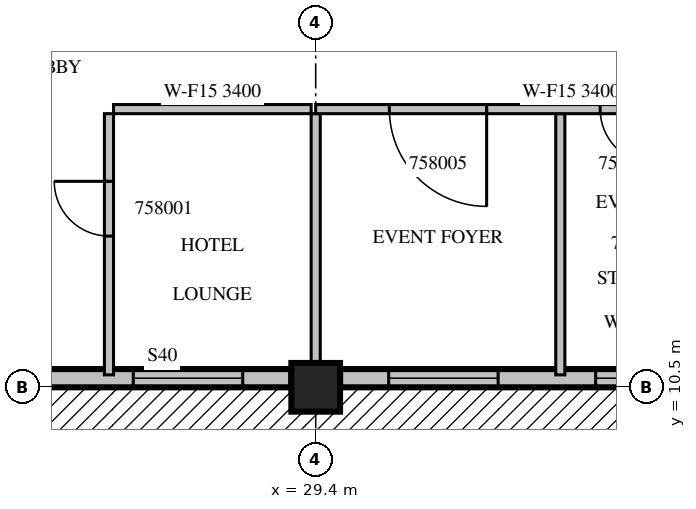
"""IFC4 building model, lengths in metres.
Left out: names, types, materials, properties, quantities, classifications, styles, units other than length and angle.
Written with IfcOpenShell. Run it as: python <this file> out.ifc"""

import sys

from ifc_helpers import new_model, si_unit, direction, frame, frame_2d, origin, origin_2d, place, context, subcontext, project, spatial, rectangle, extrude, source, transform, mapped, element, fill, save


model = new_model("IFC4")
c1 = context("Model", 3, precision=1e-05, world=origin(), true_north=direction((0.0, 1.0)))
c2 = subcontext(c1, "Body", "Model", "MODEL_VIEW")
j1 = project(units=[si_unit("LENGTHUNIT", "METRE"), si_unit("PLANEANGLEUNIT", "RADIAN")], contexts=[c1])
p1 = place(None, origin())
s1 = spatial("IfcSite", under=j1, at=p1, CompositionType="ELEMENT")
p2 = place(p1, origin())
s2 = spatial("IfcBuilding", under=s1, at=p2, CompositionType="ELEMENT")
p3 = place(p2, frame((0.0, 0.0, 253.8)))
s3 = spatial("IfcBuildingStorey", under=s2, at=p3, CompositionType="ELEMENT", Elevation=253.8)
m1 = source(origin(), c2, "Body", "SweptSolid", [
    extrude(rectangle(XDim=0.8, YDim=0.8, at=origin_2d()), origin(), (0.0, 0.0, 1.0), 3.8),
])
p4 = place(p3, frame((29.4, 10.5, 0.0), z_axis=(0.0, 0.0, 1.0), x_axis=(1.0, 0.0, 0.0)))
e1 = element("IfcColumn", 1, at=p4, inside=s3, PredefinedType="COLUMN", context=c2, shape_type="MappedRepresentation", body=[
    mapped(m1, transform((0.0, 0.0, 0.0), scale=1.0)),
])
m2 = source(origin(), c2, "Body", "SweptSolid", [
    extrude(rectangle(XDim=7.2, YDim=0.3, at=frame_2d((3.6, 0.0))), origin(), (0.0, 0.0, 1.0), 3.4),
])
p5 = place(p3, frame((21.8, 10.65, 0.0), z_axis=(0.0, 0.0, 1.0), x_axis=(1.0, 0.0, 0.0)))
e2 = element("IfcWall", 2, at=p5, inside=s3, PredefinedType="STANDARD", context=c2, shape_type="MappedRepresentation", body=[
    mapped(m2, transform((0.0, 0.0, 0.0), scale=1.0)),
])
m3 = source(origin(), c2, "Body", "SweptSolid", [
    extrude(rectangle(XDim=1.8, YDim=2.4, at=frame_2d((0.9, 1.2))), frame((0.0, 0.16, 0.0), z_axis=(0.0, -1.0, 0.0), x_axis=(1.0, 0.0, 0.0)), (0.0, 0.0, 1.0), 0.32),
])
p6 = place(p5, frame((0.4, 0.0, 0.0)))
e3 = element("IfcOpeningElement", 3, at=p6, cuts=e2, PredefinedType="OPENING", context=c2, shape_type="MappedRepresentation", body=[
    mapped(m3, transform((0.0, 0.0, 0.0), scale=1.0)),
])
p7 = place(p5, frame((4.6, 0.0, 0.0)))
e4 = element("IfcOpeningElement", 4, at=p7, cuts=e2, PredefinedType="OPENING", context=c2, shape_type="MappedRepresentation", body=[
    mapped(m3, transform((0.0, 0.0, 0.0), scale=1.0)),
])
m4 = source(origin(), c2, "Body", "SweptSolid", [
    extrude(rectangle(XDim=7.6, YDim=0.3, at=frame_2d((3.8, 0.0))), origin(), (0.0, 0.0, 1.0), 3.4),
])
p8 = place(p3, frame((29.8, 10.65, 0.0), z_axis=(0.0, 0.0, 1.0), x_axis=(1.0, 0.0, 0.0)))
e5 = element("IfcWall", 5, at=p8, inside=s3, PredefinedType="STANDARD", context=c2, shape_type="MappedRepresentation", body=[
    mapped(m4, transform((0.0, 0.0, 0.0), scale=1.0)),
])
p9 = place(p8, frame((0.8, 0.0, 0.0)))
e6 = element("IfcOpeningElement", 6, at=p9, cuts=e5, PredefinedType="OPENING", context=c2, shape_type="MappedRepresentation", body=[
    mapped(m3, transform((0.0, 0.0, 0.0), scale=1.0)),
])
m5 = source(origin(), c2, "Body", "SweptSolid", [
    extrude(rectangle(XDim=1.2, YDim=2.3, at=frame_2d((0.6, 1.15))), frame((0.0, 0.16, 0.0), z_axis=(0.0, -1.0, 0.0), x_axis=(1.0, 0.0, 0.0)), (0.0, 0.0, 1.0), 0.32),
])
p10 = place(p8, frame((4.204, 0.0, 0.6)))
e7 = element("IfcOpeningElement", 7, at=p10, cuts=e5, PredefinedType="OPENING", context=c2, shape_type="MappedRepresentation", body=[
    mapped(m5, transform((0.0, 0.0, 0.0), scale=1.0)),
])
m6 = source(origin(), c2, "Body", "SweptSolid", [
    extrude(rectangle(XDim=4.295, YDim=0.15, at=frame_2d((2.147, 0.0))), origin(), (0.0, 0.0, 1.0), 3.4),
])
p11 = place(p3, frame((26.0, 15.0, 0.0), z_axis=(0.0, 0.0, 1.0), x_axis=(0.0, -1.0, 0.0)))
e8 = element("IfcWall", 8, at=p11, inside=s3, PredefinedType="PARTITIONING", context=c2, shape_type="MappedRepresentation", body=[
    mapped(m6, transform((0.0, 0.0, 0.0), scale=1.0)),
])
m7 = source(origin(), c2, "Body", "SweptSolid", [
    extrude(rectangle(XDim=0.9, YDim=2.1, at=frame_2d((0.45, 1.05))), frame((0.0, 0.085, 0.0), z_axis=(0.0, -1.0, 0.0), x_axis=(1.0, 0.0, 0.0)), (0.0, 0.0, 1.0), 0.17),
])
p12 = place(p11, frame((1.113, 0.0, 0.0)))
e9 = element("IfcOpeningElement", 9, at=p12, cuts=e8, PredefinedType="OPENING", context=c2, shape_type="MappedRepresentation", body=[
    mapped(m7, transform((0.0, 0.0, 0.0), scale=1.0)),
])
m8 = source(origin(), c2, "Body", "SweptSolid", [
    extrude(rectangle(XDim=3.25, YDim=0.15, at=frame_2d((1.625, 0.0))), origin(), (0.0, 0.0, 1.0), 3.4),
])
p13 = place(p3, frame((29.325, 15.075, 0.0), z_axis=(0.0, 0.0, 1.0), x_axis=(-1.0, 0.0, 0.0)))
e10 = element("IfcWall", 10, at=p13, inside=s3, PredefinedType="PARTITIONING", context=c2, shape_type="MappedRepresentation", body=[
    mapped(m8, transform((0.0, 0.0, 0.0), scale=1.0)),
])
m9 = source(origin(), c2, "Body", "SweptSolid", [
    extrude(rectangle(XDim=4.101, YDim=0.15, at=frame_2d((2.05, 0.0))), origin(), (0.0, 0.0, 1.0), 3.4),
])
p14 = place(p3, frame((29.4, 10.899, 0.0), z_axis=(0.0, 0.0, 1.0), x_axis=(0.0, 1.0, 0.0)))
e11 = element("IfcWall", 11, at=p14, inside=s3, PredefinedType="PARTITIONING", context=c2, shape_type="MappedRepresentation", body=[
    mapped(m9, transform((0.0, 0.0, 0.0), scale=1.0)),
])
p15 = place(p3, frame((33.422, 10.705, 0.0), z_axis=(0.0, 0.0, 1.0), x_axis=(0.0, 1.0, 0.0)))
e12 = element("IfcWall", 12, at=p15, inside=s3, PredefinedType="PARTITIONING", context=c2, shape_type="MappedRepresentation", body=[
    mapped(m6, transform((0.0, 0.0, 0.0), scale=1.0)),
])
m10 = source(origin(), c2, "Body", "SweptSolid", [
    extrude(rectangle(XDim=8.4, YDim=0.15, at=frame_2d((4.2, 0.0))), origin(), (0.0, 0.0, 1.0), 3.4),
])
p16 = place(p3, frame((37.8, 15.075, 0.0), z_axis=(0.0, 0.0, 1.0), x_axis=(-1.0, 0.0, 0.0)))
e13 = element("IfcWall", 13, at=p16, inside=s3, PredefinedType="PARTITIONING", context=c2, shape_type="MappedRepresentation", body=[
    mapped(m10, transform((0.0, 0.0, 0.0), scale=1.0)),
])
m11 = source(origin(), c2, "Body", "SweptSolid", [
    extrude(rectangle(XDim=1.6, YDim=2.1, at=frame_2d((0.8, 1.05))), frame((0.0, 0.085, 0.0), z_axis=(0.0, -1.0, 0.0), x_axis=(1.0, 0.0, 0.0)), (0.0, 0.0, 1.0), 0.17),
])
p17 = place(p16, frame((5.589, 0.0, 0.0)))
e14 = element("IfcOpeningElement", 14, at=p17, cuts=e13, PredefinedType="OPENING", context=c2, shape_type="MappedRepresentation", body=[
    mapped(m11, transform((0.0, 0.0, 0.0), scale=1.0)),
])
p18 = place(p16, frame((2.822, 0.0, 0.0)))
e15 = element("IfcOpeningElement", 15, at=p18, cuts=e13, PredefinedType="OPENING", context=c2, shape_type="MappedRepresentation", body=[
    mapped(m7, transform((0.0, 0.0, 0.0), scale=1.0)),
])
m12 = source(origin(), c2, "Body", "SweptSolid", [
    extrude(rectangle(XDim=1.8, YDim=2.4, at=frame_2d((0.9, 1.2))), frame((0.0, 0.025, 0.0), z_axis=(0.0, -1.0, 0.0), x_axis=(1.0, 0.0, 0.0)), (0.0, 0.0, 1.0), 0.05),
])
p19 = place(p7, origin())
e16 = element("IfcDoor", 16, at=p19, inside=s3, OperationType="SLIDING_TO_LEFT", PredefinedType="DOOR", context=c2, shape_type="MappedRepresentation", body=[
    mapped(m12, transform((0.0, 0.0, 0.0), scale=1.0)),
])
fill(e4, e16)
p20 = place(p9, origin())
e17 = element("IfcDoor", 17, at=p20, inside=s3, OperationType="SLIDING_TO_LEFT", PredefinedType="DOOR", context=c2, shape_type="MappedRepresentation", body=[
    mapped(m12, transform((0.0, 0.0, 0.0), scale=1.0)),
])
fill(e6, e17)
m13 = source(origin(), c2, "Body", "SweptSolid", [
    extrude(rectangle(XDim=1.2, YDim=2.3, at=frame_2d((0.6, 1.15))), frame((0.0, 0.03, 0.0), z_axis=(0.0, -1.0, 0.0), x_axis=(1.0, 0.0, 0.0)), (0.0, 0.0, 1.0), 0.06),
])
p21 = place(p10, origin())
e18 = element("IfcWindow", 18, at=p21, inside=s3, PartitioningType="SINGLE_PANEL", PredefinedType="WINDOW", context=c2, shape_type="MappedRepresentation", body=[
    mapped(m13, transform((0.0, 0.0, 0.0), scale=1.0)),
])
fill(e7, e18)
m14 = source(origin(), c2, "Body", "SweptSolid", [
    extrude(rectangle(XDim=0.9, YDim=2.1, at=frame_2d((0.45, 1.05))), frame((0.0, 0.025, 0.0), z_axis=(0.0, -1.0, 0.0), x_axis=(1.0, 0.0, 0.0)), (0.0, 0.0, 1.0), 0.05),
])
p22 = place(p12, origin())
e19 = element("IfcDoor", 19, at=p22, inside=s3, OperationType="SINGLE_SWING_RIGHT", PredefinedType="DOOR", context=c2, shape_type="MappedRepresentation", body=[
    mapped(m14, transform((0.0, 0.0, 0.0), scale=1.0)),
])
fill(e9, e19)
m15 = source(origin(), c2, "Body", "SweptSolid", [
    extrude(rectangle(XDim=1.6, YDim=2.1, at=frame_2d((0.8, 1.05))), frame((0.0, 0.025, 0.0), z_axis=(0.0, -1.0, 0.0), x_axis=(1.0, 0.0, 0.0)), (0.0, 0.0, 1.0), 0.05),
])
p23 = place(p17, origin())
e20 = element("IfcDoor", 20, at=p23, inside=s3, OperationType="SINGLE_SWING_LEFT", PredefinedType="DOOR", context=c2, shape_type="MappedRepresentation", body=[
    mapped(m15, transform((0.0, 0.0, 0.0), scale=1.0)),
])
fill(e14, e20)
p24 = place(p18, origin())
e21 = element("IfcDoor", 21, at=p24, inside=s3, OperationType="SINGLE_SWING_LEFT", PredefinedType="DOOR", context=c2, shape_type="MappedRepresentation", body=[
    mapped(m14, transform((0.0, 0.0, 0.0), scale=1.0)),
])
fill(e15, e21)
save(model, sys.argv[1])
